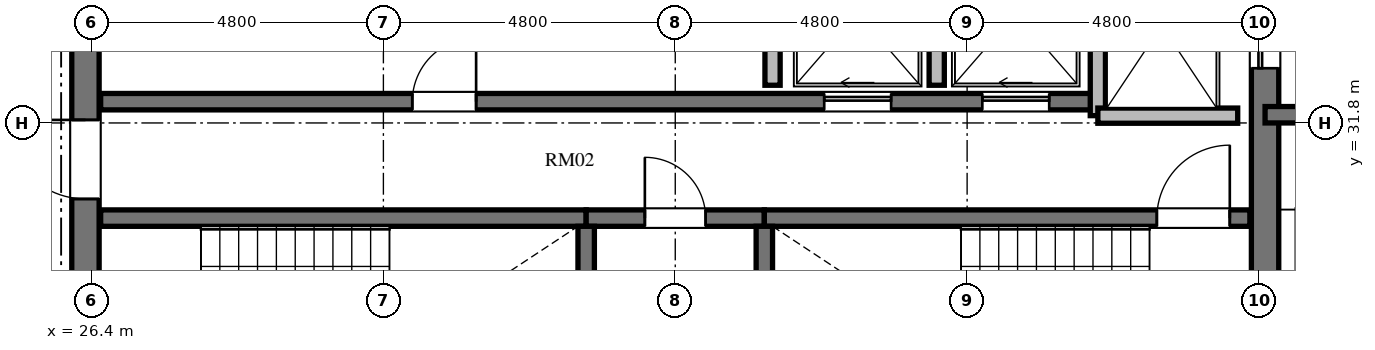
"""IFC4 building model, lengths in metres.
Left out: names, types, materials, properties, quantities, classifications, styles, units other than length and angle.
Written with IfcOpenShell. Run it as: python <this file> out.ifc"""

import sys

from ifc_helpers import new_model, si_unit, direction, frame, frame_2d, origin, place, context, subcontext, project, spatial, rectangle, extrude, element, fill, save


model = new_model("IFC4")
c1 = context("Model", 3, precision=1e-05, world=origin(), true_north=direction((0.0, 1.0)))
c2 = subcontext(c1, "Body", "Model", "MODEL_VIEW")
j1 = project(units=[si_unit("LENGTHUNIT", "METRE"), si_unit("PLANEANGLEUNIT", "RADIAN")], contexts=[c1])
p1 = place(None, origin())
s1 = spatial("IfcSite", under=j1, at=p1, CompositionType="ELEMENT")
p2 = place(p1, origin())
s2 = spatial("IfcBuilding", under=s1, at=p2, CompositionType="ELEMENT")
p3 = place(p2, frame((0.0, 0.0, 265.968)))
s3 = spatial("IfcBuildingStorey", under=s2, at=p3, CompositionType="ELEMENT", Elevation=265.968)
p4 = place(p3, frame((26.3, 20.95, 0.0), z_axis=(0.0, 0.0, 1.0), x_axis=(0.0, 1.0, 0.0)))
e1 = element("IfcWall", 1, at=p4, inside=s3, PredefinedType="SHEAR", context=c2, shape_type="SweptSolid", body=[
    extrude(rectangle(XDim=14.1, YDim=0.45, at=frame_2d((7.05, 0.0))), origin(), (0.0, 0.0, 1.0), 3.648),
])
p5 = place(p4, frame((6.5, 0.0, 0.0)))
e2 = element("IfcOpeningElement", 2, at=p5, cuts=e1, PredefinedType="OPENING", context=c2, shape_type="SweptSolid", body=[
    extrude(rectangle(XDim=1.2, YDim=2.15, at=frame_2d((0.6, 1.075))), frame((0.0, 0.235, 0.0), z_axis=(0.0, -1.0, 0.0), x_axis=(1.0, 0.0, 0.0)), (0.0, 0.0, 1.0), 0.47),
])
p6 = place(p4, frame((9.6, 0.0, 0.0)))
e3 = element("IfcOpeningElement", 3, at=p6, cuts=e1, PredefinedType="OPENING", context=c2, shape_type="SweptSolid", body=[
    extrude(rectangle(XDim=1.3, YDim=2.2, at=frame_2d((0.65, 1.1))), frame((0.0, 0.235, 0.0), z_axis=(0.0, -1.0, 0.0), x_axis=(1.0, 0.0, 0.0)), (0.0, 0.0, 1.0), 0.47),
])
p7 = place(p4, frame((2.85, 0.0, 0.0)))
e4 = element("IfcOpeningElement", 4, at=p7, cuts=e1, PredefinedType="OPENING", context=c2, shape_type="SweptSolid", body=[
    extrude(rectangle(XDim=1.0, YDim=2.04, at=frame_2d((0.5, 1.02))), frame((0.0, 0.235, 0.0), z_axis=(0.0, -1.0, 0.0), x_axis=(1.0, 0.0, 0.0)), (0.0, 0.0, 1.0), 0.47),
])
p8 = place(p3, frame((45.7, 20.95, 0.0), z_axis=(0.0, 0.0, 1.0), x_axis=(0.0, 1.0, 0.0)))
e5 = element("IfcWall", 5, at=p8, inside=s3, PredefinedType="SHEAR", context=c2, shape_type="SweptSolid", body=[
    extrude(rectangle(XDim=14.1, YDim=0.45, at=frame_2d((7.05, 0.0))), origin(), (0.0, 0.0, 1.0), 3.648),
])
p9 = place(p8, frame((11.75, 0.0, 0.0)))
e6 = element("IfcOpeningElement", 6, at=p9, cuts=e5, PredefinedType="OPENING", context=c2, shape_type="SweptSolid", body=[
    extrude(rectangle(XDim=1.4, YDim=2.3, at=frame_2d((0.7, 1.15))), frame((0.0, 0.235, 0.0), z_axis=(0.0, -1.0, 0.0), x_axis=(1.0, 0.0, 0.0)), (0.0, 0.0, 1.0), 0.47),
])
p10 = place(p8, frame((0.95, 0.0, 0.0)))
e7 = element("IfcOpeningElement", 7, at=p10, cuts=e5, PredefinedType="OPENING", context=c2, shape_type="SweptSolid", body=[
    extrude(rectangle(XDim=1.4, YDim=2.3, at=frame_2d((0.7, 1.15))), frame((0.0, 0.235, 0.0), z_axis=(0.0, -1.0, 0.0), x_axis=(1.0, 0.0, 0.0)), (0.0, 0.0, 1.0), 0.47),
])
p11 = place(p3, frame((26.55, 30.235, 0.0), z_axis=(0.0, 0.0, 1.0), x_axis=(1.0, 0.0, 0.0)))
e8 = element("IfcWall", 8, at=p11, inside=s3, PredefinedType="SHEAR", context=c2, shape_type="SweptSolid", body=[
    extrude(rectangle(XDim=7.985, YDim=0.27, at=frame_2d((3.992, 0.0))), origin(), (0.0, 0.0, 1.0), 3.648),
])
p12 = place(p3, frame((34.535, 30.235, 0.0), z_axis=(0.0, 0.0, 1.0), x_axis=(1.0, 0.0, 0.0)))
e9 = element("IfcWall", 9, at=p12, inside=s3, PredefinedType="SHEAR", context=c2, shape_type="SweptSolid", body=[
    extrude(rectangle(XDim=2.93, YDim=0.27, at=frame_2d((1.465, 0.0))), origin(), (0.0, 0.0, 1.0), 3.648),
])
p13 = place(p12, frame((0.965, 0.0, 0.0)))
e10 = element("IfcOpeningElement", 10, at=p13, cuts=e9, PredefinedType="OPENING", context=c2, shape_type="SweptSolid", body=[
    extrude(rectangle(XDim=1.0, YDim=2.1, at=frame_2d((0.5, 1.05))), frame((0.0, 0.145, 0.0), z_axis=(0.0, -1.0, 0.0), x_axis=(1.0, 0.0, 0.0)), (0.0, 0.0, 1.0), 0.29),
])
p14 = place(p3, frame((37.465, 30.235, 0.0), z_axis=(0.0, 0.0, 1.0), x_axis=(1.0, 0.0, 0.0)))
e11 = element("IfcWall", 11, at=p14, inside=s3, PredefinedType="SHEAR", context=c2, shape_type="SweptSolid", body=[
    extrude(rectangle(XDim=7.985, YDim=0.27, at=frame_2d((3.992, 0.0))), origin(), (0.0, 0.0, 1.0), 3.648),
])
p15 = place(p14, frame((6.455, 0.0, 0.0)))
e12 = element("IfcOpeningElement", 12, at=p15, cuts=e11, PredefinedType="OPENING", context=c2, shape_type="SweptSolid", body=[
    extrude(rectangle(XDim=1.2, YDim=2.15, at=frame_2d((0.6, 1.075))), frame((0.0, 0.145, 0.0), z_axis=(0.0, -1.0, 0.0), x_axis=(1.0, 0.0, 0.0)), (0.0, 0.0, 1.0), 0.29),
])
for number, where, z_axis, x_axis in (
    (13, (34.535, 26.02, 0.0), (0.0, 0.0, 1.0), (0.0, 1.0, 0.0)),
    (14, (37.465, 26.02, 0.0), (0.0, 0.0, 1.0), (0.0, 1.0, 0.0)),
):
    element("IfcWall", number, at=place(p3, frame(where, z_axis=z_axis, x_axis=x_axis)), inside=s3, PredefinedType="SHEAR", context=c2, shape_type="SweptSolid", body=[
        extrude(rectangle(XDim=4.08, YDim=0.27, at=frame_2d((2.04, 0.0))), origin(), (0.0, 0.0, 1.0), 3.648),
    ])
p16 = place(p3, frame((26.55, 32.15, 0.0), z_axis=(0.0, 0.0, 1.0), x_axis=(1.0, 0.0, 0.0)))
e15 = element("IfcWall", 15, at=p16, inside=s3, PredefinedType="SHEAR", context=c2, shape_type="SweptSolid", body=[
    extrude(rectangle(XDim=16.4, YDim=0.27, at=frame_2d((8.2, 0.0))), origin(), (0.0, 0.0, 1.0), 3.648),
])
p17 = place(p16, frame((5.125, 0.0, 0.0)))
e16 = element("IfcOpeningElement", 16, at=p17, cuts=e15, PredefinedType="OPENING", context=c2, shape_type="SweptSolid", body=[
    extrude(rectangle(XDim=1.05, YDim=2.15, at=frame_2d((0.525, 1.075))), frame((0.0, 0.145, 0.0), z_axis=(0.0, -1.0, 0.0), x_axis=(1.0, 0.0, 0.0)), (0.0, 0.0, 1.0), 0.29),
])
p18 = place(p16, frame((11.9, 0.0, 0.0)))
e17 = element("IfcOpeningElement", 17, at=p18, cuts=e15, PredefinedType="OPENING", context=c2, shape_type="SweptSolid", body=[
    extrude(rectangle(XDim=1.1, YDim=2.2, at=frame_2d((0.55, 1.1))), frame((0.0, 0.145, 0.0), z_axis=(0.0, -1.0, 0.0), x_axis=(1.0, 0.0, 0.0)), (0.0, 0.0, 1.0), 0.29),
])
p19 = place(p16, frame((14.5, 0.0, 0.0)))
e18 = element("IfcOpeningElement", 18, at=p19, cuts=e15, PredefinedType="OPENING", context=c2, shape_type="SweptSolid", body=[
    extrude(rectangle(XDim=1.1, YDim=2.2, at=frame_2d((0.55, 1.1))), frame((0.0, 0.145, 0.0), z_axis=(0.0, -1.0, 0.0), x_axis=(1.0, 0.0, 0.0)), (0.0, 0.0, 1.0), 0.29),
])
p20 = place(p3, frame((42.95, 31.92, 0.0), z_axis=(0.0, 0.0, 1.0), x_axis=(0.0, 1.0, 0.0)))
e19 = element("IfcWall", 19, at=p20, inside=s3, PredefinedType="SOLIDWALL", context=c2, shape_type="SweptSolid", body=[
    extrude(rectangle(XDim=3.18, YDim=0.25, at=frame_2d((1.59, 0.0))), origin(), (0.0, 0.0, 1.0), 3.198),
])
p21 = place(p3, frame((42.95, 31.92, 0.0), z_axis=(0.0, 0.0, 1.0), x_axis=(1.0, 0.0, 0.0)))
e20 = element("IfcWall", 20, at=p21, inside=s3, PredefinedType="SOLIDWALL", context=c2, shape_type="SweptSolid", body=[
    extrude(rectangle(XDim=2.3, YDim=0.25, at=frame_2d((1.15, 0.0))), origin(), (0.0, 0.0, 1.0), 3.198),
])
for number, where, z_axis, x_axis in (
    (21, (37.6, 32.42, 0.0), (0.0, 0.0, 1.0), (0.0, 1.0, 0.0)),
    (22, (40.3, 32.42, 0.0), (0.0, 0.0, 1.0), (0.0, 1.0, 0.0)),
):
    element("IfcWall", number, at=place(p3, frame(where, z_axis=z_axis, x_axis=x_axis)), inside=s3, PredefinedType="SOLIDWALL", context=c2, shape_type="SweptSolid", body=[
        extrude(rectangle(XDim=2.68, YDim=0.25, at=frame_2d((1.34, 0.0))), origin(), (0.0, 0.0, 1.0), 3.198),
    ])
p22 = place(p3, frame((45.7, 31.935, 0.0), z_axis=(0.0, 0.0, 1.0), x_axis=(1.0, 0.0, 0.0)))
e23 = element("IfcWall", 23, at=p22, inside=s3, PredefinedType="SHEAR", context=c2, shape_type="SweptSolid", body=[
    extrude(rectangle(XDim=4.715, YDim=0.27, at=frame_2d((2.357, 0.0))), origin(), (0.0, 0.0, 1.0), 3.648),
])
p23 = place(p15, origin())
e24 = element("IfcDoor", 24, at=p23, inside=s3, OperationType="SINGLE_SWING_RIGHT", PredefinedType="DOOR", context=c2, shape_type="SweptSolid", body=[
    extrude(rectangle(XDim=1.2, YDim=2.15, at=frame_2d((0.6, 1.075))), frame((0.0, 0.025, 0.0), z_axis=(0.0, -1.0, 0.0), x_axis=(1.0, 0.0, 0.0)), (0.0, 0.0, 1.0), 0.05),
])
fill(e12, e24)
p24 = place(p13, origin())
e25 = element("IfcDoor", 25, at=p24, inside=s3, OperationType="SINGLE_SWING_LEFT", PredefinedType="DOOR", context=c2, shape_type="SweptSolid", body=[
    extrude(rectangle(XDim=1.0, YDim=2.1, at=frame_2d((0.5, 1.05))), frame((0.0, 0.025, 0.0), z_axis=(0.0, -1.0, 0.0), x_axis=(1.0, 0.0, 0.0)), (0.0, 0.0, 1.0), 0.05),
])
fill(e10, e25)
p25 = place(p6, origin())
e26 = element("IfcDoor", 26, at=p25, inside=s3, OperationType="SINGLE_SWING_RIGHT", PredefinedType="DOOR", context=c2, shape_type="SweptSolid", body=[
    extrude(rectangle(XDim=1.3, YDim=2.2, at=frame_2d((0.65, 1.1))), frame((0.0, 0.025, 0.0), z_axis=(0.0, -1.0, 0.0), x_axis=(1.0, 0.0, 0.0)), (0.0, 0.0, 1.0), 0.05),
])
fill(e3, e26)
p26 = place(p17, origin())
e27 = element("IfcDoor", 27, at=p26, inside=s3, OperationType="SINGLE_SWING_RIGHT", PredefinedType="DOOR", context=c2, shape_type="SweptSolid", body=[
    extrude(rectangle(XDim=1.05, YDim=2.15, at=frame_2d((0.525, 1.075))), frame((0.0, 0.025, 0.0), z_axis=(0.0, -1.0, 0.0), x_axis=(1.0, 0.0, 0.0)), (0.0, 0.0, 1.0), 0.05),
])
fill(e16, e27)
p27 = place(p18, origin())
e28 = element("IfcDoor", 28, at=p27, inside=s3, OperationType="SLIDING_TO_LEFT", PredefinedType="DOOR", context=c2, shape_type="SweptSolid", body=[
    extrude(rectangle(XDim=1.1, YDim=2.2, at=frame_2d((0.55, 1.1))), frame((0.0, 0.025, 0.0), z_axis=(0.0, -1.0, 0.0), x_axis=(1.0, 0.0, 0.0)), (0.0, 0.0, 1.0), 0.05),
])
fill(e17, e28)
p28 = place(p19, origin())
e29 = element("IfcDoor", 29, at=p28, inside=s3, OperationType="SLIDING_TO_LEFT", PredefinedType="DOOR", context=c2, shape_type="SweptSolid", body=[
    extrude(rectangle(XDim=1.1, YDim=2.2, at=frame_2d((0.55, 1.1))), frame((0.0, 0.025, 0.0), z_axis=(0.0, -1.0, 0.0), x_axis=(1.0, 0.0, 0.0)), (0.0, 0.0, 1.0), 0.05),
])
fill(e18, e29)
p29 = place(p9, origin())
e30 = element("IfcDoor", 30, at=p29, inside=s3, OperationType="SLIDING_TO_LEFT", PredefinedType="DOOR", context=c2, shape_type="SweptSolid", body=[
    extrude(rectangle(XDim=1.4, YDim=2.3, at=frame_2d((0.7, 1.15))), frame((0.0, 0.025, 0.0), z_axis=(0.0, -1.0, 0.0), x_axis=(1.0, 0.0, 0.0)), (0.0, 0.0, 1.0), 0.05),
])
fill(e6, e30)
save(model, sys.argv[1])
